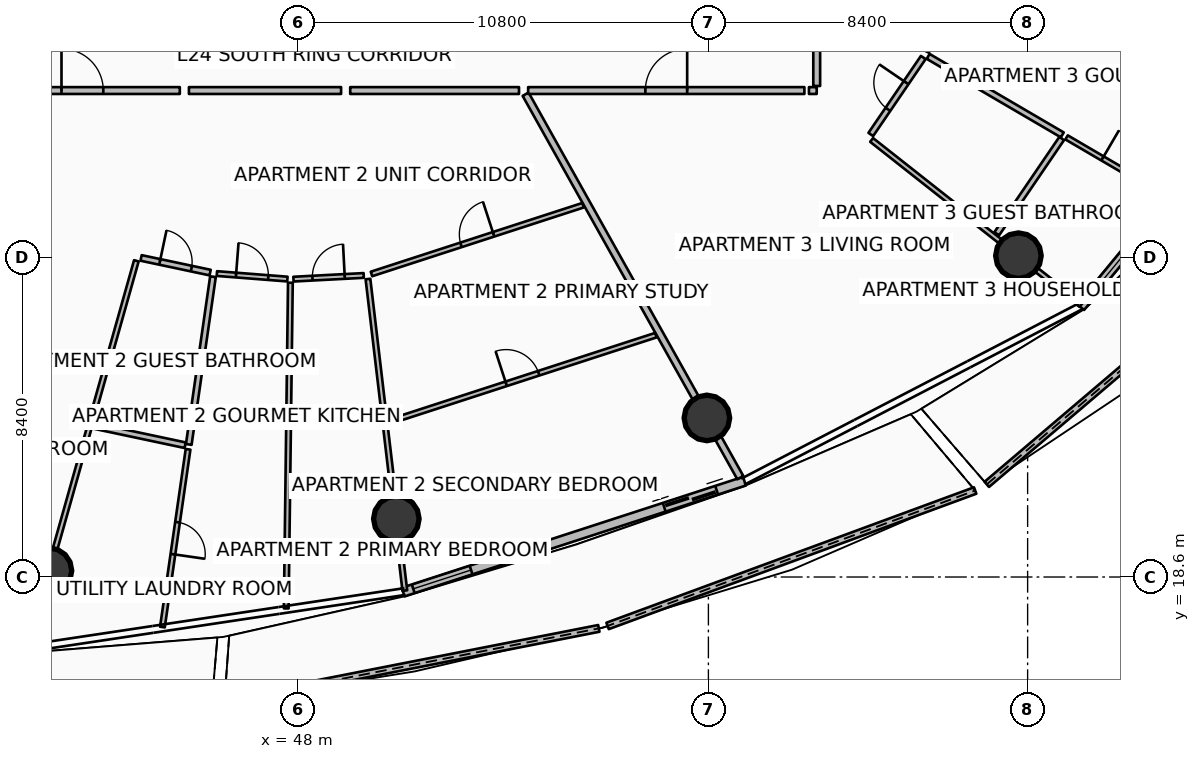
"""IFC4 building model, lengths in metres.
Left out: names, types, materials, properties, quantities, classifications, styles, units other than length and angle.
Written with IfcOpenShell. Run it as: python <this file> out.ifc"""

import sys

from ifc_helpers import new_model, si_unit, direction, frame, frame_2d, origin, origin_2d, place, context, subcontext, project, spatial, polyline, rectangle, circle, outline, extrude, element, fill, save


model = new_model("IFC4")
c1 = context("Model", 3, precision=1e-05, world=origin(), true_north=direction((0.0, 1.0)))
c2 = subcontext(c1, "Body", "Model", "MODEL_VIEW")
j1 = project(units=[si_unit("LENGTHUNIT", "METRE"), si_unit("PLANEANGLEUNIT", "RADIAN")], contexts=[c1])
p1 = place(None, origin())
s1 = spatial("IfcSite", under=j1, at=p1, CompositionType="ELEMENT")
p2 = place(p1, origin())
s2 = spatial("IfcBuilding", under=s1, at=p2, CompositionType="ELEMENT")
p3 = place(p2, frame((0.0, 0.0, 97.65)))
s3 = spatial("IfcBuildingStorey", under=s2, at=p3, CompositionType="ELEMENT", Elevation=97.65)
for number, where, z_axis, x_axis in (
    (1, (41.447, 18.766, 0.0), (0.0, 0.0, 1.0), (1.0, 0.0, 0.0)),
    (2, (50.588, 20.131, 0.0), (0.0, 0.0, 1.0), (1.0, 0.0, 0.0)),
    (3, (58.76, 22.786, 0.0), (0.0, 0.0, 1.0), (1.0, 0.0, 0.0)),
    (4, (66.958, 27.055, 0.0), (0.0, 0.0, 1.0), (1.0, 0.0, 0.0)),
):
    element("IfcColumn", number, at=place(p3, frame(where, z_axis=z_axis, x_axis=x_axis)), inside=s3, PredefinedType="COLUMN", context=c2, shape_type="SweptSolid", body=[
        extrude(circle(Radius=0.6, at=origin_2d()), origin(), (0.0, 0.0, 1.0), 3.5),
    ])
p4 = place(p3, frame((34.799, 15.85, 0.0), z_axis=(0.0, 0.0, 1.0), x_axis=(0.998637836961, -0.052177299569, 0.0)))
e5 = element("IfcWall", 5, at=p4, inside=s3, PredefinedType="PARAPET", context=c2, shape_type="SweptSolid", body=[
    extrude(outline(polyline([(0.0, 0.0), (10.949, 0.0), (10.949, 1.224), (5.474, 1.127), (0.0, 1.148), (0.0, 0.0)])), frame((0.0, 0.09, 0.0), z_axis=(0.0, -1.0, 0.0), x_axis=(1.0, 0.0, 0.0)), (0.0, 0.0, 1.0), 0.18),
])
p5 = place(p3, frame((46.064, 15.314, 0.0), z_axis=(0.0, 0.0, 1.0), x_axis=(0.98127943736, 0.192589370979, 0.0)))
e6 = element("IfcWall", 6, at=p5, inside=s3, PredefinedType="PARAPET", context=c2, shape_type="SweptSolid", body=[
    extrude(outline(polyline([(0.0, 0.0), (10.041, 0.0), (10.041, 1.632), (5.021, 1.418), (0.0, 1.233), (0.0, 0.0)])), frame((0.0, 0.09, 0.0), z_axis=(0.0, -1.0, 0.0), x_axis=(1.0, 0.0, 0.0)), (0.0, 0.0, 1.0), 0.18),
])
p6 = place(p3, frame((56.147, 17.313, 0.0), z_axis=(0.0, 0.0, 1.0), x_axis=(0.938356460989, 0.345669136777, 0.0)))
e7 = element("IfcWall", 7, at=p6, inside=s3, PredefinedType="PARAPET", context=c2, shape_type="SweptSolid", body=[
    extrude(outline(polyline([(0.0, 0.0), (10.308, 0.0), (10.308, 1.86), (5.154, 1.798), (0.0, 1.632), (0.0, 0.0)])), frame((0.0, 0.09, 0.0), z_axis=(0.0, -1.0, 0.0), x_axis=(1.0, 0.0, 0.0)), (0.0, 0.0, 1.0), 0.18),
])
p7 = place(p3, frame((66.126, 21.038, 0.0), z_axis=(0.0, 0.0, 1.0), x_axis=(0.761849488871, 0.647754086291, 0.0)))
e8 = element("IfcWall", 8, at=p7, inside=s3, PredefinedType="PARAPET", context=c2, shape_type="SweptSolid", body=[
    extrude(outline(polyline([(0.0, 0.0), (11.2, 0.0), (11.2, 1.632), (5.6, 1.798), (0.0, 1.86), (0.0, 0.0)])), frame((0.0, 0.09, 0.0), z_axis=(0.0, -1.0, 0.0), x_axis=(1.0, 0.0, 0.0)), (0.0, 0.0, 1.0), 0.18),
])
p8 = place(p3, frame((50.767, 18.203, 0.0), z_axis=(0.0, 0.0, 1.0), x_axis=(0.951052494852, 0.30902937083, 0.0)))
e9 = element("IfcWall", 9, at=p8, inside=s3, PredefinedType="SOLIDWALL", context=c2, shape_type="SweptSolid", body=[
    extrude(rectangle(XDim=9.444, YDim=0.24, at=frame_2d((4.722, 0.0))), origin(), (0.0, 0.0, 1.0), 2.45),
])
p9 = place(p8, frame((7.224, 0.0, 0.0)))
e10 = element("IfcOpeningElement", 10, at=p9, cuts=e9, PredefinedType="OPENING", context=c2, shape_type="SweptSolid", body=[
    extrude(rectangle(XDim=1.45, YDim=2.15, at=frame_2d((0.725, 1.075))), frame((0.0, 0.13, 0.0), z_axis=(0.0, -1.0, 0.0), x_axis=(1.0, 0.0, 0.0)), (0.0, 0.0, 1.0), 0.26),
])
p10 = place(p8, frame((0.28, 0.0, 0.65)))
e11 = element("IfcOpeningElement", 11, at=p10, cuts=e9, PredefinedType="OPENING", context=c2, shape_type="SweptSolid", body=[
    extrude(rectangle(XDim=1.6, YDim=1.5, at=frame_2d((0.8, 0.75))), frame((0.0, 0.13, 0.0), z_axis=(0.0, -1.0, 0.0), x_axis=(1.0, 0.0, 0.0)), (0.0, 0.0, 1.0), 0.26),
])
p11 = place(p3, frame((68.593, 25.702, 0.0), z_axis=(0.0, 0.0, 1.0), x_axis=(0.636704975, 0.771107498868, 0.0)))
e12 = element("IfcWall", 12, at=p11, inside=s3, PredefinedType="SOLIDWALL", context=c2, shape_type="SweptSolid", body=[
    extrude(rectangle(XDim=11.084, YDim=0.24, at=frame_2d((5.542, 0.0))), origin(), (0.0, 0.0, 1.0), 2.45),
])
p12 = place(p11, frame((8.864, 0.0, 0.0)))
e13 = element("IfcOpeningElement", 13, at=p12, cuts=e12, PredefinedType="OPENING", context=c2, shape_type="SweptSolid", body=[
    extrude(rectangle(XDim=1.45, YDim=2.15, at=frame_2d((0.725, 1.075))), frame((0.0, 0.13, 0.0), z_axis=(0.0, -1.0, 0.0), x_axis=(1.0, 0.0, 0.0)), (0.0, 0.0, 1.0), 0.26),
])
p13 = place(p11, frame((0.28, 0.0, 0.65)))
e14 = element("IfcOpeningElement", 14, at=p13, cuts=e12, PredefinedType="OPENING", context=c2, shape_type="SweptSolid", body=[
    extrude(rectangle(XDim=1.6, YDim=1.5, at=frame_2d((0.8, 0.75))), frame((0.0, 0.13, 0.0), z_axis=(0.0, -1.0, 0.0), x_axis=(1.0, 0.0, 0.0)), (0.0, 0.0, 1.0), 0.26),
])
p14 = place(p3, frame((53.99, 31.304, 0.0), z_axis=(0.0, 0.0, 1.0), x_axis=(0.488628442553, -0.872491974249, 0.0)))
e15 = element("IfcWall", 15, at=p14, inside=s3, PredefinedType="PARTITIONING", context=c2, shape_type="SweptSolid", body=[
    extrude(rectangle(XDim=11.563, YDim=0.18, at=frame_2d((5.782, 0.0))), origin(), (0.0, 0.0, 1.0), 2.94),
])
p15 = place(p3, frame((39.764, 31.4, 0.0), z_axis=(0.0, 0.0, 1.0), x_axis=(1.0, 0.0, 0.0)))
e16 = element("IfcWall", 16, at=p15, inside=s3, PredefinedType="PARTITIONING", context=c2, shape_type="SweptSolid", body=[
    extrude(rectangle(XDim=5.127, YDim=0.18, at=frame_2d((2.563, 0.0))), origin(), (0.0, 0.0, 1.0), 2.94),
])
p16 = place(p15, frame((2.013, 0.0, 0.0)))
e17 = element("IfcOpeningElement", 17, at=p16, cuts=e16, PredefinedType="OPENING", context=c2, shape_type="SweptSolid", body=[
    extrude(rectangle(XDim=1.1, YDim=2.1, at=frame_2d((0.55, 1.05))), frame((0.0, 0.1, 0.0), z_axis=(0.0, -1.0, 0.0), x_axis=(1.0, 0.0, 0.0)), (0.0, 0.0, 1.0), 0.2),
])
p17 = place(p3, frame((45.131, 31.4, 0.0), z_axis=(0.0, 0.0, 1.0), x_axis=(1.0, 0.0, 0.0)))
e18 = element("IfcWall", 18, at=p17, inside=s3, PredefinedType="PARTITIONING", context=c2, shape_type="SweptSolid", body=[
    extrude(rectangle(XDim=4.004, YDim=0.18, at=frame_2d((2.002, 0.0))), origin(), (0.0, 0.0, 1.0), 2.94),
])
p18 = place(p3, frame((43.747, 26.92, 0.0), z_axis=(0.0, 0.0, 1.0), x_axis=(-0.271445765154, -0.962453737371, 0.0)))
e19 = element("IfcWall", 19, at=p18, inside=s3, PredefinedType="PARTITIONING", context=c2, shape_type="SweptSolid", body=[
    extrude(rectangle(XDim=10.47, YDim=0.125, at=frame_2d((5.235, 0.0))), origin(), (0.0, 0.0, 1.0), 2.94),
])
p19 = place(p3, frame((43.872, 26.996, 0.0), z_axis=(0.0, 0.0, 1.0), x_axis=(0.978233316216, -0.207508021641, 0.0)))
e20 = element("IfcWall", 20, at=p19, inside=s3, PredefinedType="PARTITIONING", context=c2, shape_type="SweptSolid", body=[
    extrude(rectangle(XDim=1.857, YDim=0.15, at=frame_2d((0.928, 0.0))), origin(), (0.0, 0.0, 1.0), 2.94),
])
p20 = place(p19, frame((0.503, 0.0, 0.0)))
e21 = element("IfcOpeningElement", 21, at=p20, cuts=e20, PredefinedType="OPENING", context=c2, shape_type="SweptSolid", body=[
    extrude(rectangle(XDim=0.85, YDim=2.06, at=frame_2d((0.425, 1.03))), frame((0.0, 0.085, 0.0), z_axis=(0.0, -1.0, 0.0), x_axis=(1.0, 0.0, 0.0)), (0.0, 0.0, 1.0), 0.17),
])
p21 = place(p3, frame((42.626, 22.578, 0.0), z_axis=(0.0, 0.0, 1.0), x_axis=(0.978227408947, -0.207535867706, 0.0)))
e22 = element("IfcWall", 22, at=p21, inside=s3, PredefinedType="PARTITIONING", context=c2, shape_type="SweptSolid", body=[
    extrude(rectangle(XDim=2.46, YDim=0.15, at=frame_2d((1.23, 0.0))), origin(), (0.0, 0.0, 1.0), 2.94),
])
p22 = place(p3, frame((45.763, 26.502, 0.0), z_axis=(0.0, 0.0, 1.0), x_axis=(-0.142823722461, -0.989748141853, 0.0)))
e23 = element("IfcWall", 23, at=p22, inside=s3, PredefinedType="PARTITIONING", context=c2, shape_type="SweptSolid", body=[
    extrude(rectangle(XDim=4.46, YDim=0.15, at=frame_2d((2.23, 0.0))), origin(), (0.0, 0.0, 1.0), 2.94),
])
p23 = place(p3, frame((45.108, 21.96, 0.0), z_axis=(0.0, 0.0, 1.0), x_axis=(-0.142860663544, -0.989742810437, 0.0)))
e24 = element("IfcWall", 24, at=p23, inside=s3, PredefinedType="PARTITIONING", context=c2, shape_type="SweptSolid", body=[
    extrude(rectangle(XDim=4.725, YDim=0.125, at=frame_2d((2.363, 0.0))), origin(), (0.0, 0.0, 1.0), 2.94),
])
p24 = place(p23, frame((1.938, 0.0, 0.0)))
e25 = element("IfcOpeningElement", 25, at=p24, cuts=e24, PredefinedType="OPENING", context=c2, shape_type="SweptSolid", body=[
    extrude(rectangle(XDim=0.85, YDim=2.06, at=frame_2d((0.425, 1.03))), frame((0.0, 0.073, 0.0), z_axis=(0.0, -1.0, 0.0), x_axis=(1.0, 0.0, 0.0)), (0.0, 0.0, 1.0), 0.145),
])
p25 = place(p3, frame((47.8, 26.343, 0.0), z_axis=(0.0, 0.0, 1.0), x_axis=(-0.012762129717, -0.999918560706, 0.0)))
e26 = element("IfcWall", 26, at=p25, inside=s3, PredefinedType="PARTITIONING", context=c2, shape_type="SweptSolid", body=[
    extrude(rectangle(XDim=8.57, YDim=0.125, at=frame_2d((4.285, 0.0))), origin(), (0.0, 0.0, 1.0), 2.94),
])
p26 = place(p3, frame((45.866, 26.585, 0.0), z_axis=(0.0, 0.0, 1.0), x_axis=(0.996949395434, -0.078050643458, 0.0)))
e27 = element("IfcWall", 27, at=p26, inside=s3, PredefinedType="PARTITIONING", context=c2, shape_type="SweptSolid", body=[
    extrude(rectangle(XDim=1.861, YDim=0.125, at=frame_2d((0.931, 0.0))), origin(), (0.0, 0.0, 1.0), 2.94),
])
p27 = place(p26, frame((0.506, 0.0, 0.0)))
e28 = element("IfcOpeningElement", 28, at=p27, cuts=e27, PredefinedType="OPENING", context=c2, shape_type="SweptSolid", body=[
    extrude(rectangle(XDim=0.85, YDim=2.06, at=frame_2d((0.425, 1.03))), frame((0.0, 0.073, 0.0), z_axis=(0.0, -1.0, 0.0), x_axis=(1.0, 0.0, 0.0)), (0.0, 0.0, 1.0), 0.145),
])
p28 = place(p3, frame((47.881, 26.438, 0.0), z_axis=(0.0, 0.0, 1.0), x_axis=(0.998621833411, 0.052482700343, 0.0)))
e29 = element("IfcWall", 29, at=p28, inside=s3, PredefinedType="PARTITIONING", context=c2, shape_type="SweptSolid", body=[
    extrude(rectangle(XDim=1.851, YDim=0.125, at=frame_2d((0.926, 0.0))), origin(), (0.0, 0.0, 1.0), 2.94),
])
p29 = place(p28, frame((0.5, 0.0, 0.0)))
e30 = element("IfcOpeningElement", 30, at=p29, cuts=e29, PredefinedType="OPENING", context=c2, shape_type="SweptSolid", body=[
    extrude(rectangle(XDim=0.85, YDim=2.06, at=frame_2d((0.425, 1.03))), frame((0.0, 0.073, 0.0), z_axis=(0.0, -1.0, 0.0), x_axis=(1.0, 0.0, 0.0)), (0.0, 0.0, 1.0), 0.145),
])
p30 = place(p3, frame((49.375, 31.4, 0.0), z_axis=(0.0, 0.0, 1.0), x_axis=(1.0, 0.0, 0.0)))
e31 = element("IfcWall", 31, at=p30, inside=s3, PredefinedType="PARTITIONING", context=c2, shape_type="SweptSolid", body=[
    extrude(rectangle(XDim=4.442, YDim=0.18, at=frame_2d((2.221, 0.0))), origin(), (0.0, 0.0, 1.0), 2.94),
])
p31 = place(p3, frame((49.842, 26.441, 0.0), z_axis=(0.0, 0.0, 1.0), x_axis=(0.11753793763, -0.993068393021, 0.0)))
e32 = element("IfcWall", 32, at=p31, inside=s3, PredefinedType="PARTITIONING", context=c2, shape_type="SweptSolid", body=[
    extrude(rectangle(XDim=8.254, YDim=0.125, at=frame_2d((4.127, 0.0))), origin(), (0.0, 0.0, 1.0), 2.94),
])
p32 = place(p3, frame((49.934, 26.574, 0.0), z_axis=(0.0, 0.0, 1.0), x_axis=(0.951057969744, 0.309012521082, 0.0)))
e33 = element("IfcWall", 33, at=p32, inside=s3, PredefinedType="PARTITIONING", context=c2, shape_type="SweptSolid", body=[
    extrude(rectangle(XDim=5.854, YDim=0.125, at=frame_2d((2.927, 0.0))), origin(), (0.0, 0.0, 1.0), 2.94),
])
p33 = place(p32, frame((2.477, 0.0, 0.0)))
e34 = element("IfcOpeningElement", 34, at=p33, cuts=e33, PredefinedType="OPENING", context=c2, shape_type="SweptSolid", body=[
    extrude(rectangle(XDim=0.9, YDim=2.08, at=frame_2d((0.45, 1.04))), frame((0.0, 0.073, 0.0), z_axis=(0.0, -1.0, 0.0), x_axis=(1.0, 0.0, 0.0)), (0.0, 0.0, 1.0), 0.145),
])
p34 = place(p3, frame((50.395, 22.682, 0.0), z_axis=(0.0, 0.0, 1.0), x_axis=(0.951062980527, 0.308997098808, 0.0)))
e35 = element("IfcWall", 35, at=p34, inside=s3, PredefinedType="PARTITIONING", context=c2, shape_type="SweptSolid", body=[
    extrude(rectangle(XDim=7.384, YDim=0.125, at=frame_2d((3.692, 0.0))), origin(), (0.0, 0.0, 1.0), 2.94),
])
p35 = place(p34, frame((3.242, 0.0, 0.0)))
e36 = element("IfcOpeningElement", 36, at=p35, cuts=e35, PredefinedType="OPENING", context=c2, shape_type="SweptSolid", body=[
    extrude(rectangle(XDim=0.9, YDim=2.08, at=frame_2d((0.45, 1.04))), frame((0.0, 0.073, 0.0), z_axis=(0.0, -1.0, 0.0), x_axis=(1.0, 0.0, 0.0)), (0.0, 0.0, 1.0), 0.145),
])
p36 = place(p3, frame((54.056, 31.4, 0.0), z_axis=(0.0, 0.0, 1.0), x_axis=(1.0, 0.0, 0.0)))
e37 = element("IfcWall", 37, at=p36, inside=s3, PredefinedType="PARTITIONING", context=c2, shape_type="SweptSolid", body=[
    extrude(rectangle(XDim=7.27, YDim=0.18, at=frame_2d((3.635, 0.0))), origin(), (0.0, 0.0, 1.0), 2.94),
])
p37 = place(p36, frame((3.085, 0.0, 0.0)))
e38 = element("IfcOpeningElement", 38, at=p37, cuts=e37, PredefinedType="OPENING", context=c2, shape_type="SweptSolid", body=[
    extrude(rectangle(XDim=1.1, YDim=2.1, at=frame_2d((0.55, 1.05))), frame((0.0, 0.1, 0.0), z_axis=(0.0, -1.0, 0.0), x_axis=(1.0, 0.0, 0.0)), (0.0, 0.0, 1.0), 0.2),
])
p38 = place(p3, frame((61.446, 31.4, 0.0), z_axis=(0.0, 0.0, 1.0), x_axis=(1.0, 0.0, 0.0)))
e39 = element("IfcWall", 39, at=p38, inside=s3, PredefinedType="PARTITIONING", context=c2, shape_type="SweptSolid", body=[
    extrude(rectangle(XDim=0.204, YDim=0.18, at=frame_2d((0.102, 0.0))), origin(), (0.0, 0.0, 1.0), 2.94),
])
p39 = place(p3, frame((61.65, 31.52, 0.0), z_axis=(0.0, 0.0, 1.0), x_axis=(0.0, 1.0, 0.0)))
e40 = element("IfcWall", 40, at=p39, inside=s3, PredefinedType="PARTITIONING", context=c2, shape_type="SweptSolid", body=[
    extrude(rectangle(XDim=6.51, YDim=0.18, at=frame_2d((3.255, 0.0))), origin(), (0.0, 0.0, 1.0), 2.94),
])
p40 = place(p3, frame((63.095, 30.1, 0.0), z_axis=(0.0, 0.0, 1.0), x_axis=(0.78530300145, -0.6191116183, 0.0)))
e41 = element("IfcWall", 41, at=p40, inside=s3, PredefinedType="PARTITIONING", context=c2, shape_type="SweptSolid", body=[
    extrude(rectangle(XDim=7.016, YDim=0.125, at=frame_2d((3.508, 0.0))), origin(), (0.0, 0.0, 1.0), 2.94),
])
p41 = place(p3, frame((63.073, 30.244, 0.0), z_axis=(0.0, 0.0, 1.0), x_axis=(0.563472809808, 0.826134609254, 0.0)))
e42 = element("IfcWall", 42, at=p41, inside=s3, PredefinedType="PARTITIONING", context=c2, shape_type="SweptSolid", body=[
    extrude(rectangle(XDim=2.451, YDim=0.15, at=frame_2d((1.226, 0.0))), origin(), (0.0, 0.0, 1.0), 2.94),
])
p42 = place(p41, frame((0.801, 0.0, 0.0)))
e43 = element("IfcOpeningElement", 43, at=p42, cuts=e42, PredefinedType="OPENING", context=c2, shape_type="SweptSolid", body=[
    extrude(rectangle(XDim=0.85, YDim=2.06, at=frame_2d((0.425, 1.03))), frame((0.0, 0.085, 0.0), z_axis=(0.0, -1.0, 0.0), x_axis=(1.0, 0.0, 0.0)), (0.0, 0.0, 1.0), 0.17),
])
p43 = place(p3, frame((66.387, 27.632, 0.0), z_axis=(0.0, 0.0, 1.0), x_axis=(0.563341818284, 0.826223938029, 0.0)))
e44 = element("IfcWall", 44, at=p43, inside=s3, PredefinedType="PARTITIONING", context=c2, shape_type="SweptSolid", body=[
    extrude(rectangle(XDim=3.034, YDim=0.15, at=frame_2d((1.517, 0.0))), origin(), (0.0, 0.0, 1.0), 2.94),
])
p44 = place(p3, frame((64.583, 32.298, 0.0), z_axis=(0.0, 0.0, 1.0), x_axis=(0.863128698129, -0.504984010109, 0.0)))
e45 = element("IfcWall", 45, at=p44, inside=s3, PredefinedType="PARTITIONING", context=c2, shape_type="SweptSolid", body=[
    extrude(rectangle(XDim=4.09, YDim=0.15, at=frame_2d((2.045, 0.0))), origin(), (0.0, 0.0, 1.0), 2.94),
])
p45 = place(p3, frame((68.225, 30.167, 0.0), z_axis=(0.0, 0.0, 1.0), x_axis=(0.863132180625, -0.504978057711, 0.0)))
e46 = element("IfcWall", 46, at=p45, inside=s3, PredefinedType="PARTITIONING", context=c2, shape_type="SweptSolid", body=[
    extrude(rectangle(XDim=3.043, YDim=0.125, at=frame_2d((1.521, 0.0))), origin(), (0.0, 0.0, 1.0), 2.94),
])
p46 = place(p45, frame((1.096, 0.0, 0.0)))
e47 = element("IfcOpeningElement", 47, at=p46, cuts=e46, PredefinedType="OPENING", context=c2, shape_type="SweptSolid", body=[
    extrude(rectangle(XDim=0.85, YDim=2.06, at=frame_2d((0.425, 1.03))), frame((0.0, 0.073, 0.0), z_axis=(0.0, -1.0, 0.0), x_axis=(1.0, 0.0, 0.0)), (0.0, 0.0, 1.0), 0.145),
])
p47 = place(p3, frame((65.746, 34.639, 0.0), z_axis=(0.0, 0.0, 1.0), x_axis=(0.923687629783, -0.383146398373, 0.0)))
e48 = element("IfcWall", 48, at=p47, inside=s3, PredefinedType="PARTITIONING", context=c2, shape_type="SweptSolid", body=[
    extrude(rectangle(XDim=8.122, YDim=0.125, at=frame_2d((4.061, 0.0))), origin(), (0.0, 0.0, 1.0), 2.94),
])
p48 = place(p3, frame((64.545, 32.424, 0.0), z_axis=(0.0, 0.0, 1.0), x_axis=(0.445043296976, 0.895509052895, 0.0)))
e49 = element("IfcWall", 49, at=p48, inside=s3, PredefinedType="PARTITIONING", context=c2, shape_type="SweptSolid", body=[
    extrude(rectangle(XDim=2.431, YDim=0.125, at=frame_2d((1.216, 0.0))), origin(), (0.0, 0.0, 1.0), 2.94),
])
p49 = place(p48, frame((0.791, 0.0, 0.0)))
e50 = element("IfcOpeningElement", 50, at=p49, cuts=e49, PredefinedType="OPENING", context=c2, shape_type="SweptSolid", body=[
    extrude(rectangle(XDim=0.85, YDim=2.06, at=frame_2d((0.425, 1.03))), frame((0.0, 0.073, 0.0), z_axis=(0.0, -1.0, 0.0), x_axis=(1.0, 0.0, 0.0)), (0.0, 0.0, 1.0), 0.145),
])
p50 = place(p9, origin())
e51 = element("IfcDoor", 51, at=p50, inside=s3, OperationType="DOUBLE_DOOR_SLIDING", PredefinedType="DOOR", context=c2, shape_type="SweptSolid", body=[
    extrude(rectangle(XDim=1.45, YDim=2.15, at=frame_2d((0.725, 1.075))), frame((0.0, 0.025, 0.0), z_axis=(0.0, -1.0, 0.0), x_axis=(1.0, 0.0, 0.0)), (0.0, 0.0, 1.0), 0.05),
])
fill(e10, e51)
p51 = place(p10, origin())
e52 = element("IfcWindow", 52, at=p51, inside=s3, PartitioningType="SINGLE_PANEL", PredefinedType="WINDOW", context=c2, shape_type="SweptSolid", body=[
    extrude(rectangle(XDim=1.6, YDim=1.5, at=frame_2d((0.8, 0.75))), frame((0.0, 0.03, 0.0), z_axis=(0.0, -1.0, 0.0), x_axis=(1.0, 0.0, 0.0)), (0.0, 0.0, 1.0), 0.06),
])
fill(e11, e52)
p52 = place(p13, origin())
e53 = element("IfcWindow", 53, at=p52, inside=s3, PartitioningType="SINGLE_PANEL", PredefinedType="WINDOW", context=c2, shape_type="SweptSolid", body=[
    extrude(rectangle(XDim=1.6, YDim=1.5, at=frame_2d((0.8, 0.75))), frame((0.0, 0.03, 0.0), z_axis=(0.0, -1.0, 0.0), x_axis=(1.0, 0.0, 0.0)), (0.0, 0.0, 1.0), 0.06),
])
fill(e14, e53)
p53 = place(p16, origin())
e54 = element("IfcDoor", 54, at=p53, inside=s3, OperationType="SINGLE_SWING_LEFT", PredefinedType="DOOR", context=c2, shape_type="SweptSolid", body=[
    extrude(rectangle(XDim=1.1, YDim=2.1, at=frame_2d((0.55, 1.05))), frame((0.0, 0.025, 0.0), z_axis=(0.0, -1.0, 0.0), x_axis=(1.0, 0.0, 0.0)), (0.0, 0.0, 1.0), 0.05),
])
fill(e17, e54)
p54 = place(p20, origin())
e55 = element("IfcDoor", 55, at=p54, inside=s3, OperationType="SINGLE_SWING_LEFT", PredefinedType="DOOR", context=c2, shape_type="SweptSolid", body=[
    extrude(rectangle(XDim=0.85, YDim=2.06, at=frame_2d((0.425, 1.03))), frame((0.0, 0.025, 0.0), z_axis=(0.0, -1.0, 0.0), x_axis=(1.0, 0.0, 0.0)), (0.0, 0.0, 1.0), 0.05),
])
fill(e21, e55)
p55 = place(p24, origin())
e56 = element("IfcDoor", 56, at=p55, inside=s3, OperationType="SINGLE_SWING_RIGHT", PredefinedType="DOOR", context=c2, shape_type="SweptSolid", body=[
    extrude(rectangle(XDim=0.85, YDim=2.06, at=frame_2d((0.425, 1.03))), frame((0.0, 0.025, 0.0), z_axis=(0.0, -1.0, 0.0), x_axis=(1.0, 0.0, 0.0)), (0.0, 0.0, 1.0), 0.05),
])
fill(e25, e56)
p56 = place(p27, origin())
e57 = element("IfcDoor", 57, at=p56, inside=s3, OperationType="SINGLE_SWING_LEFT", PredefinedType="DOOR", context=c2, shape_type="SweptSolid", body=[
    extrude(rectangle(XDim=0.85, YDim=2.06, at=frame_2d((0.425, 1.03))), frame((0.0, 0.025, 0.0), z_axis=(0.0, -1.0, 0.0), x_axis=(1.0, 0.0, 0.0)), (0.0, 0.0, 1.0), 0.05),
])
fill(e28, e57)
p57 = place(p29, origin())
e58 = element("IfcDoor", 58, at=p57, inside=s3, OperationType="SINGLE_SWING_RIGHT", PredefinedType="DOOR", context=c2, shape_type="SweptSolid", body=[
    extrude(rectangle(XDim=0.85, YDim=2.06, at=frame_2d((0.425, 1.03))), frame((0.0, 0.025, 0.0), z_axis=(0.0, -1.0, 0.0), x_axis=(1.0, 0.0, 0.0)), (0.0, 0.0, 1.0), 0.05),
])
fill(e30, e58)
p58 = place(p33, origin())
e59 = element("IfcDoor", 59, at=p58, inside=s3, OperationType="SINGLE_SWING_RIGHT", PredefinedType="DOOR", context=c2, shape_type="SweptSolid", body=[
    extrude(rectangle(XDim=0.9, YDim=2.08, at=frame_2d((0.45, 1.04))), frame((0.0, 0.025, 0.0), z_axis=(0.0, -1.0, 0.0), x_axis=(1.0, 0.0, 0.0)), (0.0, 0.0, 1.0), 0.05),
])
fill(e34, e59)
p59 = place(p35, origin())
e60 = element("IfcDoor", 60, at=p59, inside=s3, OperationType="SINGLE_SWING_LEFT", PredefinedType="DOOR", context=c2, shape_type="SweptSolid", body=[
    extrude(rectangle(XDim=0.9, YDim=2.08, at=frame_2d((0.45, 1.04))), frame((0.0, 0.025, 0.0), z_axis=(0.0, -1.0, 0.0), x_axis=(1.0, 0.0, 0.0)), (0.0, 0.0, 1.0), 0.05),
])
fill(e36, e60)
p60 = place(p37, origin())
e61 = element("IfcDoor", 61, at=p60, inside=s3, OperationType="SINGLE_SWING_RIGHT", PredefinedType="DOOR", context=c2, shape_type="SweptSolid", body=[
    extrude(rectangle(XDim=1.1, YDim=2.1, at=frame_2d((0.55, 1.05))), frame((0.0, 0.025, 0.0), z_axis=(0.0, -1.0, 0.0), x_axis=(1.0, 0.0, 0.0)), (0.0, 0.0, 1.0), 0.05),
])
fill(e38, e61)
p61 = place(p42, origin())
e62 = element("IfcDoor", 62, at=p61, inside=s3, OperationType="SINGLE_SWING_RIGHT", PredefinedType="DOOR", context=c2, shape_type="SweptSolid", body=[
    extrude(rectangle(XDim=0.85, YDim=2.06, at=frame_2d((0.425, 1.03))), frame((0.0, 0.025, 0.0), z_axis=(0.0, -1.0, 0.0), x_axis=(1.0, 0.0, 0.0)), (0.0, 0.0, 1.0), 0.05),
])
fill(e43, e62)
p62 = place(p46, origin())
e63 = element("IfcDoor", 63, at=p62, inside=s3, OperationType="SINGLE_SWING_LEFT", PredefinedType="DOOR", context=c2, shape_type="SweptSolid", body=[
    extrude(rectangle(XDim=0.85, YDim=2.06, at=frame_2d((0.425, 1.03))), frame((0.0, 0.025, 0.0), z_axis=(0.0, -1.0, 0.0), x_axis=(1.0, 0.0, 0.0)), (0.0, 0.0, 1.0), 0.05),
])
fill(e47, e63)
save(model, sys.argv[1])
